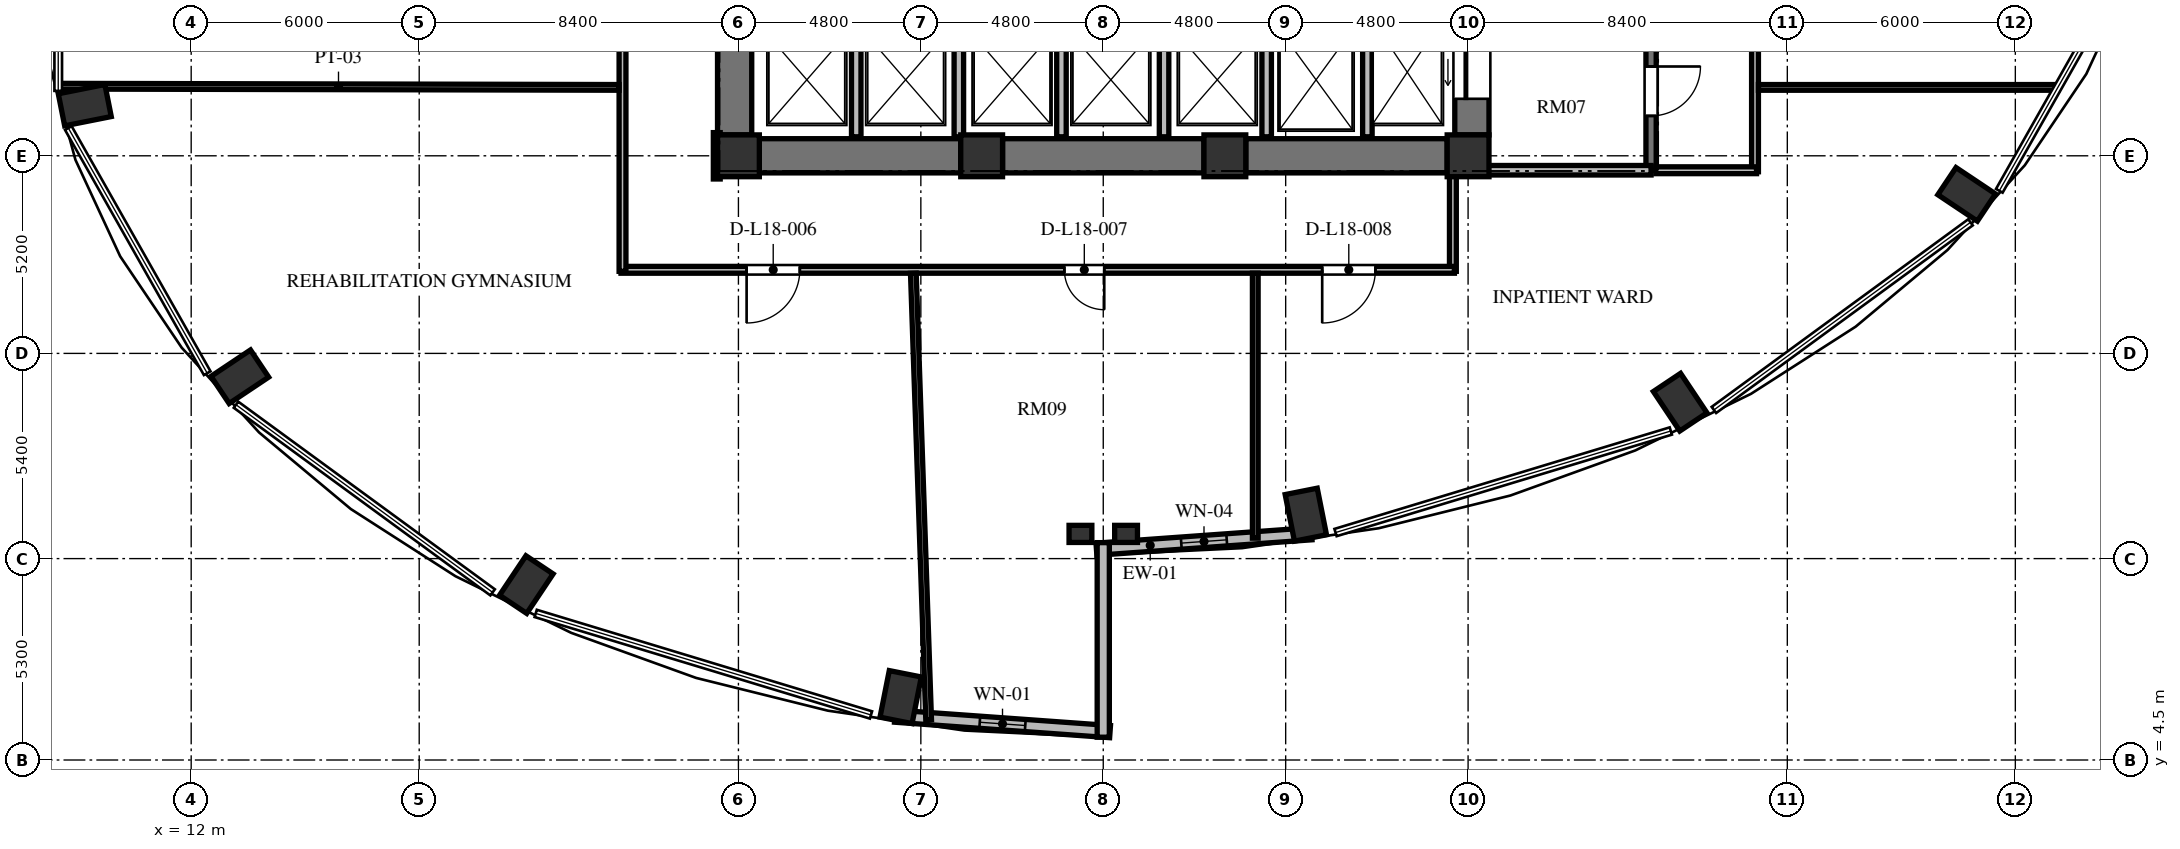
"""IFC4 building model, lengths in metres.
Left out: names, types, materials, properties, quantities, classifications, styles, units other than length and angle.
Written with IfcOpenShell. Run it as: python <this file> out.ifc"""

import sys

from ifc_helpers import new_model, si_unit, direction, frame, frame_2d, origin, origin_2d, place, context, subcontext, project, spatial, rectangle, extrude, element, fill, save


model = new_model("IFC4")
c1 = context("Model", 3, precision=1e-05, world=origin(), true_north=direction((0.0, 1.0)))
c2 = subcontext(c1, "Body", "Model", "MODEL_VIEW")
j1 = project(units=[si_unit("LENGTHUNIT", "METRE"), si_unit("PLANEANGLEUNIT", "RADIAN")], contexts=[c1])
p1 = place(None, origin())
s1 = spatial("IfcSite", under=j1, at=p1, CompositionType="ELEMENT")
p2 = place(p1, origin())
s2 = spatial("IfcBuilding", under=s1, at=p2, CompositionType="ELEMENT")
p3 = place(p2, frame((0.0, 0.0, 72.624)))
s3 = spatial("IfcBuildingStorey", under=s2, at=p3, CompositionType="ELEMENT", Elevation=72.624)
for number, where, z_axis, x_axis in (
    (1, (41.331, 10.956, 0.0), (0.0, 0.0, 1.0), (0.195, -0.981, 0.0)),
    (2, (51.181, 13.916, 0.0), (0.0, 0.0, 1.0), (0.556, -0.831, 0.0)),
    (3, (58.72, 19.386, 0.0), (0.0, 0.0, 1.0), (0.831, -0.556, 0.0)),
    (4, (9.2, 21.732, 0.0), (0.0, 0.0, 1.0), (-0.981, -0.195, 0.0)),
    (5, (13.28, 14.586, 0.0), (0.0, 0.0, 1.0), (-0.831, -0.556, 0.0)),
    (6, (20.819, 9.116, 0.0), (0.0, 0.0, 1.0), (-0.556, -0.831, 0.0)),
    (7, (30.669, 6.156, 0.0), (0.0, 0.0, 1.0), (-0.195, -0.981, 0.0)),
):
    element("IfcColumn", number, at=place(p3, frame(where, z_axis=z_axis, x_axis=x_axis)), inside=s3, PredefinedType="COLUMN", context=c2, shape_type="SweptSolid", body=[
        extrude(rectangle(XDim=1.25, YDim=0.86, at=origin_2d()), origin(), (0.0, 0.0, 1.0), 3.648),
    ])
for number, where, z_axis, x_axis in (
    (8, (26.4, 20.4, 0.0), (0.0, 0.0, 1.0), (1.0, 0.0, 0.0)),
    (9, (32.8, 20.4, 0.0), (0.0, 0.0, 1.0), (1.0, 0.0, 0.0)),
    (10, (39.2, 20.4, 0.0), (0.0, 0.0, 1.0), (1.0, 0.0, 0.0)),
    (11, (45.6, 20.4, 0.0), (0.0, 0.0, 1.0), (1.0, 0.0, 0.0)),
):
    element("IfcColumn", number, at=place(p3, frame(where, z_axis=z_axis, x_axis=x_axis)), inside=s3, PredefinedType="COLUMN", context=c2, shape_type="SweptSolid", body=[
        extrude(rectangle(XDim=1.1, YDim=1.1, at=origin_2d()), origin(), (0.0, 0.0, 1.0), 3.648),
    ])
for number, where, z_axis, x_axis in (
    (12, (35.4, 10.45, 0.0), (0.0, 0.0, 1.0), (1.0, 0.0, 0.0)),
    (13, (36.6, 10.45, 0.0), (0.0, 0.0, 1.0), (1.0, 0.0, 0.0)),
):
    element("IfcColumn", number, at=place(p3, frame(where, z_axis=z_axis, x_axis=x_axis)), inside=s3, PredefinedType="PILASTER", context=c2, shape_type="SweptSolid", body=[
        extrude(rectangle(XDim=0.6, YDim=0.45, at=origin_2d()), origin(), (0.0, 0.0, 1.0), 3.648),
    ])
p4 = place(p3, frame((26.3, 20.95, 0.0), z_axis=(0.0, 0.0, 1.0), x_axis=(0.0, 1.0, 0.0)))
e14 = element("IfcWall", 14, at=p4, inside=s3, PredefinedType="SHEAR", context=c2, shape_type="SweptSolid", body=[
    extrude(rectangle(XDim=14.1, YDim=0.9, at=frame_2d((7.05, 0.0))), origin(), (0.0, 0.0, 1.0), 3.648),
])
p5 = place(p4, frame((6.5, 0.0, 0.0)))
e15 = element("IfcOpeningElement", 15, at=p5, cuts=e14, PredefinedType="OPENING", context=c2, shape_type="SweptSolid", body=[
    extrude(rectangle(XDim=1.2, YDim=2.15, at=frame_2d((0.6, 1.075))), frame((0.0, 0.46, 0.0), z_axis=(0.0, -1.0, 0.0), x_axis=(1.0, 0.0, 0.0)), (0.0, 0.0, 1.0), 0.92),
])
p6 = place(p4, frame((9.6, 0.0, 0.0)))
e16 = element("IfcOpeningElement", 16, at=p6, cuts=e14, PredefinedType="OPENING", context=c2, shape_type="SweptSolid", body=[
    extrude(rectangle(XDim=1.3, YDim=2.2, at=frame_2d((0.65, 1.1))), frame((0.0, 0.46, 0.0), z_axis=(0.0, -1.0, 0.0), x_axis=(1.0, 0.0, 0.0)), (0.0, 0.0, 1.0), 0.92),
])
p7 = place(p4, frame((3.26, 0.0, 0.0)))
e17 = element("IfcOpeningElement", 17, at=p7, cuts=e14, PredefinedType="OPENING", context=c2, shape_type="SweptSolid", body=[
    extrude(rectangle(XDim=1.3, YDim=2.2, at=frame_2d((0.65, 1.1))), frame((0.0, 0.46, 0.0), z_axis=(0.0, -1.0, 0.0), x_axis=(1.0, 0.0, 0.0)), (0.0, 0.0, 1.0), 0.92),
])
p8 = place(p3, frame((45.7, 20.95, 0.0), z_axis=(0.0, 0.0, 1.0), x_axis=(0.0, 1.0, 0.0)))
e18 = element("IfcWall", 18, at=p8, inside=s3, PredefinedType="SHEAR", context=c2, shape_type="SweptSolid", body=[
    extrude(rectangle(XDim=14.1, YDim=0.9, at=frame_2d((7.05, 0.0))), origin(), (0.0, 0.0, 1.0), 3.648),
])
p9 = place(p8, frame((11.75, 0.0, 0.0)))
e19 = element("IfcOpeningElement", 19, at=p9, cuts=e18, PredefinedType="OPENING", context=c2, shape_type="SweptSolid", body=[
    extrude(rectangle(XDim=1.4, YDim=2.3, at=frame_2d((0.7, 1.15))), frame((0.0, 0.46, 0.0), z_axis=(0.0, -1.0, 0.0), x_axis=(1.0, 0.0, 0.0)), (0.0, 0.0, 1.0), 0.92),
])
p10 = place(p8, frame((0.95, 0.0, 0.0)))
e20 = element("IfcOpeningElement", 20, at=p10, cuts=e18, PredefinedType="OPENING", context=c2, shape_type="SweptSolid", body=[
    extrude(rectangle(XDim=1.4, YDim=2.3, at=frame_2d((0.7, 1.15))), frame((0.0, 0.46, 0.0), z_axis=(0.0, -1.0, 0.0), x_axis=(1.0, 0.0, 0.0)), (0.0, 0.0, 1.0), 0.92),
])
p11 = place(p3, frame((26.95, 20.4, 0.0), z_axis=(0.0, 0.0, 1.0), x_axis=(1.0, 0.0, 0.0)))
e21 = element("IfcWall", 21, at=p11, inside=s3, PredefinedType="SHEAR", context=c2, shape_type="SweptSolid", body=[
    extrude(rectangle(XDim=5.3, YDim=0.9, at=frame_2d((2.65, 0.0))), origin(), (0.0, 0.0, 1.0), 3.648),
])
p12 = place(p3, frame((33.35, 20.4, 0.0), z_axis=(0.0, 0.0, 1.0), x_axis=(1.0, 0.0, 0.0)))
e22 = element("IfcWall", 22, at=p12, inside=s3, PredefinedType="SHEAR", context=c2, shape_type="SweptSolid", body=[
    extrude(rectangle(XDim=5.3, YDim=0.9, at=frame_2d((2.65, 0.0))), origin(), (0.0, 0.0, 1.0), 3.648),
])
p13 = place(p3, frame((39.75, 20.4, 0.0), z_axis=(0.0, 0.0, 1.0), x_axis=(1.0, 0.0, 0.0)))
e23 = element("IfcWall", 23, at=p13, inside=s3, PredefinedType="SHEAR", context=c2, shape_type="SweptSolid", body=[
    extrude(rectangle(XDim=5.3, YDim=0.9, at=frame_2d((2.65, 0.0))), origin(), (0.0, 0.0, 1.0), 3.648),
])
p14 = place(p3, frame((35.821, 10.047, 0.0), z_axis=(0.0, 0.0, 1.0), x_axis=(0.997422321809, 0.071754525696, 0.0)))
e24 = element("IfcWall", 24, at=p14, inside=s3, PredefinedType="SOLIDWALL", context=c2, shape_type="SweptSolid", body=[
    extrude(rectangle(XDim=5.675, YDim=0.32, at=frame_2d((2.838, 0.0))), origin(), (0.0, 0.0, 1.0), 3.198),
])
p15 = place(p14, frame((2.238, 0.0, 0.85)))
e25 = element("IfcOpeningElement", 25, at=p15, cuts=e24, PredefinedType="OPENING", context=c2, shape_type="SweptSolid", body=[
    extrude(rectangle(XDim=1.2, YDim=1.8, at=frame_2d((0.6, 0.9))), frame((0.0, 0.17, 0.0), z_axis=(0.0, -1.0, 0.0), x_axis=(1.0, 0.0, 0.0)), (0.0, 0.0, 1.0), 0.34),
])
p16 = place(p3, frame((30.519, 5.654, 0.0), z_axis=(0.0, 0.0, 1.0), x_axis=(0.997421878774, -0.071760683825, 0.0)))
e26 = element("IfcWall", 26, at=p16, inside=s3, PredefinedType="SOLIDWALL", context=c2, shape_type="SweptSolid", body=[
    extrude(rectangle(XDim=5.675, YDim=0.32, at=frame_2d((2.837, 0.0))), origin(), (0.0, 0.0, 1.0), 3.198),
])
p17 = place(p16, frame((2.237, 0.0, 0.85)))
e27 = element("IfcOpeningElement", 27, at=p17, cuts=e26, PredefinedType="OPENING", context=c2, shape_type="SweptSolid", body=[
    extrude(rectangle(XDim=1.2, YDim=2.2, at=frame_2d((0.6, 1.1))), frame((0.0, 0.17, 0.0), z_axis=(0.0, -1.0, 0.0), x_axis=(1.0, 0.0, 0.0)), (0.0, 0.0, 1.0), 0.34),
])
p18 = place(p3, frame((36.0, 5.1, 0.0), z_axis=(0.0, 0.0, 1.0), x_axis=(0.0, 1.0, 0.0)))
e28 = element("IfcWall", 28, at=p18, inside=s3, PredefinedType="SOLIDWALL", context=c2, shape_type="SweptSolid", body=[
    extrude(rectangle(XDim=5.12, YDim=0.32, at=frame_2d((2.56, 0.0))), origin(), (0.0, 0.0, 1.0), 3.198),
])
p19 = place(p3, frame((42.95, 20.9, 0.0), z_axis=(0.0, 0.0, 1.0), x_axis=(0.0, 1.0, 0.0)))
e29 = element("IfcWall", 29, at=p19, inside=s3, PredefinedType="SOLIDWALL", context=c2, shape_type="SweptSolid", body=[
    extrude(rectangle(XDim=3.2, YDim=0.25, at=frame_2d((1.6, 0.0))), origin(), (0.0, 0.0, 1.0), 3.198),
])
for number, where, z_axis, x_axis in (
    (30, (29.5, 20.9, 0.0), (0.0, 0.0, 1.0), (0.0, 1.0, 0.0)),
    (31, (32.2, 20.9, 0.0), (0.0, 0.0, 1.0), (0.0, 1.0, 0.0)),
    (32, (34.9, 20.9, 0.0), (0.0, 0.0, 1.0), (0.0, 1.0, 0.0)),
    (33, (37.6, 20.9, 0.0), (0.0, 0.0, 1.0), (0.0, 1.0, 0.0)),
    (34, (40.3, 20.9, 0.0), (0.0, 0.0, 1.0), (0.0, 1.0, 0.0)),
):
    element("IfcWall", number, at=place(p3, frame(where, z_axis=z_axis, x_axis=x_axis)), inside=s3, PredefinedType="SOLIDWALL", context=c2, shape_type="SweptSolid", body=[
        extrude(rectangle(XDim=2.8, YDim=0.25, at=frame_2d((1.4, 0.0))), origin(), (0.0, 0.0, 1.0), 3.198),
    ])
p20 = place(p3, frame((50.415, 35.845, 0.0), z_axis=(0.0, 0.0, 1.0), x_axis=(0.0, -1.0, 0.0)))
e35 = element("IfcWall", 35, at=p20, inside=s3, PredefinedType="SHEAR", context=c2, shape_type="SweptSolid", body=[
    extrude(rectangle(XDim=15.825, YDim=0.27, at=frame_2d((7.913, 0.0))), origin(), (0.0, 0.0, 1.0), 3.648),
])
p21 = place(p20, frame((4.445, 0.0, 0.0)))
e36 = element("IfcOpeningElement", 36, at=p21, cuts=e35, PredefinedType="OPENING", context=c2, shape_type="SweptSolid", body=[
    extrude(rectangle(XDim=1.2, YDim=2.15, at=frame_2d((0.6, 1.075))), frame((0.0, 0.145, 0.0), z_axis=(0.0, -1.0, 0.0), x_axis=(1.0, 0.0, 0.0)), (0.0, 0.0, 1.0), 0.29),
])
p22 = place(p20, frame((1.295, 0.0, 0.0)))
e37 = element("IfcOpeningElement", 37, at=p22, cuts=e35, PredefinedType="OPENING", context=c2, shape_type="SweptSolid", body=[
    extrude(rectangle(XDim=1.3, YDim=2.2, at=frame_2d((0.65, 1.1))), frame((0.0, 0.145, 0.0), z_axis=(0.0, -1.0, 0.0), x_axis=(1.0, 0.0, 0.0)), (0.0, 0.0, 1.0), 0.29),
])
p23 = place(p20, frame((13.095, 0.0, 0.0)))
e38 = element("IfcOpeningElement", 38, at=p23, cuts=e35, PredefinedType="OPENING", context=c2, shape_type="SweptSolid", body=[
    extrude(rectangle(XDim=1.3, YDim=2.2, at=frame_2d((0.65, 1.1))), frame((0.0, 0.145, 0.0), z_axis=(0.0, -1.0, 0.0), x_axis=(1.0, 0.0, 0.0)), (0.0, 0.0, 1.0), 0.29),
])
p24 = place(p3, frame((45.7, 20.02, 0.0), z_axis=(0.0, 0.0, 1.0), x_axis=(1.0, 0.0, 0.0)))
e39 = element("IfcWall", 39, at=p24, inside=s3, PredefinedType="SOLIDWALL", context=c2, shape_type="SweptSolid", body=[
    extrude(rectangle(XDim=4.715, YDim=0.25, at=frame_2d((2.357, 0.0))), origin(), (0.0, 0.0, 1.0), 2.583),
])
p25 = place(p3, frame((53.15, 26.64, 0.0), z_axis=(0.0, 0.0, 1.0), x_axis=(0.0, -1.0, 0.0)))
e40 = element("IfcWall", 40, at=p25, inside=s3, PredefinedType="PARTITIONING", context=c2, shape_type="SweptSolid", body=[
    extrude(rectangle(XDim=6.66, YDim=0.18, at=frame_2d((3.33, 0.0))), origin(), (0.0, 0.0, 1.0), 3.198),
])
p26 = place(p3, frame((53.19, 20.02, 0.0), z_axis=(0.0, 0.0, 1.0), x_axis=(-1.0, 0.0, 0.0)))
e41 = element("IfcWall", 41, at=p26, inside=s3, PredefinedType="PARTITIONING", context=c2, shape_type="SweptSolid", body=[
    extrude(rectangle(XDim=2.65, YDim=0.18, at=frame_2d((1.325, 0.0))), origin(), (0.0, 0.0, 1.0), 2.583),
])
p27 = place(p3, frame((25.83, 21.01, 0.0), z_axis=(0.0, 0.0, 1.0), x_axis=(0.0, -1.0, 0.0)))
e42 = element("IfcWall", 42, at=p27, inside=s3, PredefinedType="PARTITIONING", context=c2, shape_type="SweptSolid", body=[
    extrude(rectangle(XDim=1.22, YDim=0.18, at=frame_2d((0.61, 0.0))), origin(), (0.0, 0.0, 1.0), 3.198),
])
p28 = place(p3, frame((45.2, 19.91, 0.0), z_axis=(0.0, 0.0, 1.0), x_axis=(0.0, -1.0, 0.0)))
e43 = element("IfcWall", 43, at=p28, inside=s3, PredefinedType="PARTITIONING", context=c2, shape_type="SweptSolid", body=[
    extrude(rectangle(XDim=2.55, YDim=0.18, at=frame_2d((1.275, 0.0))), origin(), (0.0, 0.0, 1.0), 3.198),
])
p29 = place(p3, frame((45.24, 17.4, 0.0), z_axis=(0.0, 0.0, 1.0), x_axis=(-1.0, 0.0, 0.0)))
e44 = element("IfcWall", 44, at=p29, inside=s3, PredefinedType="PARTITIONING", context=c2, shape_type="SweptSolid", body=[
    extrude(rectangle(XDim=21.93, YDim=0.18, at=frame_2d((10.965, 0.0))), origin(), (0.0, 0.0, 1.0), 2.823),
])
p30 = place(p29, frame((17.225, 0.0, 0.0)))
e45 = element("IfcOpeningElement", 45, at=p30, cuts=e44, PredefinedType="OPENING", context=c2, shape_type="SweptSolid", body=[
    extrude(rectangle(XDim=1.4, YDim=2.2, at=frame_2d((0.7, 1.1))), frame((0.0, 0.1, 0.0), z_axis=(0.0, -1.0, 0.0), x_axis=(1.0, 0.0, 0.0)), (0.0, 0.0, 1.0), 0.2),
])
p31 = place(p29, frame((9.214, 0.0, 0.0)))
e46 = element("IfcOpeningElement", 46, at=p31, cuts=e44, PredefinedType="OPENING", context=c2, shape_type="SweptSolid", body=[
    extrude(rectangle(XDim=1.05, YDim=2.15, at=frame_2d((0.525, 1.075))), frame((0.0, 0.1, 0.0), z_axis=(0.0, -1.0, 0.0), x_axis=(1.0, 0.0, 0.0)), (0.0, 0.0, 1.0), 0.2),
])
p32 = place(p29, frame((2.079, 0.0, 0.0)))
e47 = element("IfcOpeningElement", 47, at=p32, cuts=e44, PredefinedType="OPENING", context=c2, shape_type="SweptSolid", body=[
    extrude(rectangle(XDim=1.4, YDim=2.2, at=frame_2d((0.7, 1.1))), frame((0.0, 0.1, 0.0), z_axis=(0.0, -1.0, 0.0), x_axis=(1.0, 0.0, 0.0)), (0.0, 0.0, 1.0), 0.2),
])
p33 = place(p3, frame((23.35, 17.36, 0.0), z_axis=(0.0, 0.0, 1.0), x_axis=(0.0, 1.0, 0.0)))
e48 = element("IfcWall", 48, at=p33, inside=s3, PredefinedType="PARTITIONING", context=c2, shape_type="SweptSolid", body=[
    extrude(rectangle(XDim=9.28, YDim=0.18, at=frame_2d((4.64, 0.0))), origin(), (0.0, 0.0, 1.0), 3.198),
])
p34 = place(p3, frame((8.493, 22.231, 0.0), z_axis=(0.0, 0.0, 1.0), x_axis=(0.999997760873, -0.002116187438, 0.0)))
e49 = element("IfcWall", 49, at=p34, inside=s3, PredefinedType="PARTITIONING", context=c2, shape_type="SweptSolid", body=[
    extrude(rectangle(XDim=14.767, YDim=0.15, at=frame_2d((7.384, 0.0))), origin(), (0.0, 0.0, 1.0), 3.198),
])
p35 = place(p3, frame((53.24, 22.2, 0.0), z_axis=(0.0, 0.0, 1.0), x_axis=(1.0, 0.0, 0.0)))
e50 = element("IfcWall", 50, at=p35, inside=s3, PredefinedType="PARTITIONING", context=c2, shape_type="SweptSolid", body=[
    extrude(rectangle(XDim=7.875, YDim=0.15, at=frame_2d((3.938, 0.0))), origin(), (0.0, 0.0, 1.0), 3.198),
])
p36 = place(p3, frame((31.405, 5.559, 0.0), z_axis=(0.0, 0.0, 1.0), x_axis=(-0.034219123574, 0.9994143543, 0.0)))
e51 = element("IfcWall", 51, at=p36, inside=s3, PredefinedType="PARTITIONING", context=c2, shape_type="SweptSolid", body=[
    extrude(rectangle(XDim=11.758, YDim=0.15, at=frame_2d((5.879, 0.0))), origin(), (0.0, 0.0, 1.0), 2.583),
])
p37 = place(p3, frame((40.0, 10.338, 0.0), z_axis=(0.0, 0.0, 1.0), x_axis=(0.0, 1.0, 0.0)))
e52 = element("IfcWall", 52, at=p37, inside=s3, PredefinedType="PARTITIONING", context=c2, shape_type="SweptSolid", body=[
    extrude(rectangle(XDim=6.972, YDim=0.15, at=frame_2d((3.486, 0.0))), origin(), (0.0, 0.0, 1.0), 2.583),
])
p38 = place(p15, origin())
e53 = element("IfcWindow", 53, at=p38, inside=s3, PartitioningType="SINGLE_PANEL", PredefinedType="WINDOW", context=c2, shape_type="SweptSolid", body=[
    extrude(rectangle(XDim=1.2, YDim=1.8, at=frame_2d((0.6, 0.9))), frame((0.0, 0.03, 0.0), z_axis=(0.0, -1.0, 0.0), x_axis=(1.0, 0.0, 0.0)), (0.0, 0.0, 1.0), 0.06),
])
fill(e25, e53)
p39 = place(p17, origin())
e54 = element("IfcWindow", 54, at=p39, inside=s3, PartitioningType="SINGLE_PANEL", PredefinedType="WINDOW", context=c2, shape_type="SweptSolid", body=[
    extrude(rectangle(XDim=1.2, YDim=2.2, at=frame_2d((0.6, 1.1))), frame((0.0, 0.03, 0.0), z_axis=(0.0, -1.0, 0.0), x_axis=(1.0, 0.0, 0.0)), (0.0, 0.0, 1.0), 0.06),
])
fill(e27, e54)
p40 = place(p10, origin())
e55 = element("IfcDoor", 55, at=p40, inside=s3, OperationType="SLIDING_TO_LEFT", PredefinedType="DOOR", context=c2, shape_type="SweptSolid", body=[
    extrude(rectangle(XDim=1.4, YDim=2.3, at=frame_2d((0.7, 1.15))), frame((0.0, 0.025, 0.0), z_axis=(0.0, -1.0, 0.0), x_axis=(1.0, 0.0, 0.0)), (0.0, 0.0, 1.0), 0.05),
])
fill(e20, e55)
p41 = place(p23, origin())
e56 = element("IfcDoor", 56, at=p41, inside=s3, OperationType="SINGLE_SWING_LEFT", PredefinedType="DOOR", context=c2, shape_type="SweptSolid", body=[
    extrude(rectangle(XDim=1.3, YDim=2.2, at=frame_2d((0.65, 1.1))), frame((0.0, 0.025, 0.0), z_axis=(0.0, -1.0, 0.0), x_axis=(1.0, 0.0, 0.0)), (0.0, 0.0, 1.0), 0.05),
])
fill(e38, e56)
p42 = place(p30, origin())
e57 = element("IfcDoor", 57, at=p42, inside=s3, OperationType="SINGLE_SWING_RIGHT", PredefinedType="DOOR", context=c2, shape_type="SweptSolid", body=[
    extrude(rectangle(XDim=1.4, YDim=2.2, at=frame_2d((0.7, 1.1))), frame((0.0, 0.025, 0.0), z_axis=(0.0, -1.0, 0.0), x_axis=(1.0, 0.0, 0.0)), (0.0, 0.0, 1.0), 0.05),
])
fill(e45, e57)
p43 = place(p31, origin())
e58 = element("IfcDoor", 58, at=p43, inside=s3, OperationType="SINGLE_SWING_LEFT", PredefinedType="DOOR", context=c2, shape_type="SweptSolid", body=[
    extrude(rectangle(XDim=1.05, YDim=2.15, at=frame_2d((0.525, 1.075))), frame((0.0, 0.025, 0.0), z_axis=(0.0, -1.0, 0.0), x_axis=(1.0, 0.0, 0.0)), (0.0, 0.0, 1.0), 0.05),
])
fill(e46, e58)
p44 = place(p32, origin())
e59 = element("IfcDoor", 59, at=p44, inside=s3, OperationType="SINGLE_SWING_RIGHT", PredefinedType="DOOR", context=c2, shape_type="SweptSolid", body=[
    extrude(rectangle(XDim=1.4, YDim=2.2, at=frame_2d((0.7, 1.1))), frame((0.0, 0.025, 0.0), z_axis=(0.0, -1.0, 0.0), x_axis=(1.0, 0.0, 0.0)), (0.0, 0.0, 1.0), 0.05),
])
fill(e47, e59)
save(model, sys.argv[1])
